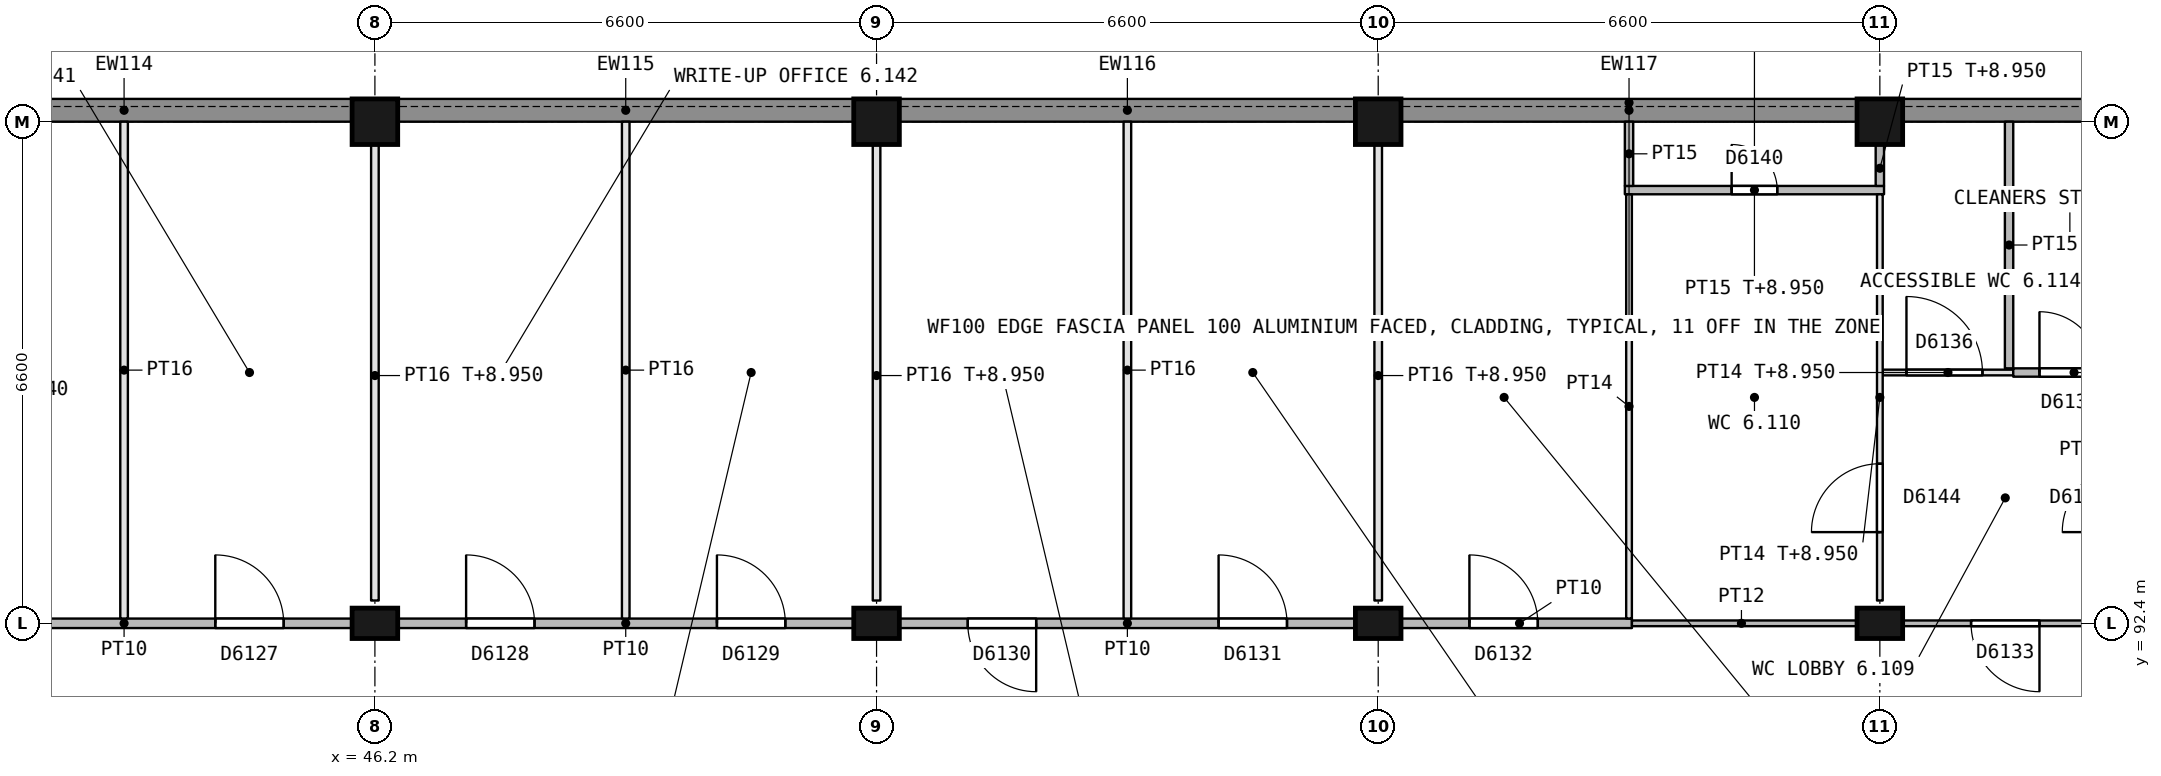
"""IFC4 building model, lengths in metres.
Left out: names, types, materials, properties, quantities, classifications, styles, units other than length and angle.
Written with IfcOpenShell. Run it as: python <this file> out.ifc"""

import sys

from ifc_helpers import new_model, si_unit, direction, frame, frame_2d, origin, origin_2d, place, context, subcontext, project, spatial, rectangle, extrude, element, fill, save


model = new_model("IFC4")
c1 = context("Model", 3, precision=1e-05, world=origin(), true_north=direction((0.0, 1.0)))
c2 = subcontext(c1, "Body", "Model", "MODEL_VIEW")
j1 = project(units=[si_unit("LENGTHUNIT", "METRE"), si_unit("PLANEANGLEUNIT", "RADIAN")], contexts=[c1])
p1 = place(None, origin())
s1 = spatial("IfcSite", under=j1, at=p1, CompositionType="ELEMENT")
p2 = place(p1, origin())
s2 = spatial("IfcBuilding", under=s1, at=p2, CompositionType="ELEMENT")
p3 = place(p2, frame((0.0, 0.0, 5.4)))
s3 = spatial("IfcBuildingStorey", under=s2, at=p3, CompositionType="ELEMENT", Elevation=5.4)
p4 = place(p3, frame((46.2, 92.4, 0.0), z_axis=(0.0, 0.0, 1.0), x_axis=(1.0, 0.0, 0.0)))
e1 = element("IfcColumn", 1, at=p4, inside=s3, PredefinedType="COLUMN", context=c2, shape_type="SweptSolid", body=[
    extrude(rectangle(XDim=0.6, YDim=0.4, at=origin_2d()), origin(), (0.0, 0.0, 1.0), 4.5),
])
p5 = place(p3, frame((46.2, 99.0, 0.0), z_axis=(0.0, 0.0, 1.0), x_axis=(1.0, 0.0, 0.0)))
e2 = element("IfcColumn", 2, at=p5, inside=s3, PredefinedType="COLUMN", context=c2, shape_type="SweptSolid", body=[
    extrude(rectangle(XDim=0.6, YDim=0.6, at=origin_2d()), origin(), (0.0, 0.0, 1.0), 4.5),
])
p6 = place(p3, frame((52.8, 92.4, 0.0), z_axis=(0.0, 0.0, 1.0), x_axis=(1.0, 0.0, 0.0)))
e3 = element("IfcColumn", 3, at=p6, inside=s3, PredefinedType="COLUMN", context=c2, shape_type="SweptSolid", body=[
    extrude(rectangle(XDim=0.6, YDim=0.4, at=origin_2d()), origin(), (0.0, 0.0, 1.0), 4.5),
])
p7 = place(p3, frame((52.8, 99.0, 0.0), z_axis=(0.0, 0.0, 1.0), x_axis=(1.0, 0.0, 0.0)))
e4 = element("IfcColumn", 4, at=p7, inside=s3, PredefinedType="COLUMN", context=c2, shape_type="SweptSolid", body=[
    extrude(rectangle(XDim=0.6, YDim=0.6, at=origin_2d()), origin(), (0.0, 0.0, 1.0), 4.5),
])
p8 = place(p3, frame((59.4, 92.4, 0.0), z_axis=(0.0, 0.0, 1.0), x_axis=(1.0, 0.0, 0.0)))
e5 = element("IfcColumn", 5, at=p8, inside=s3, PredefinedType="COLUMN", context=c2, shape_type="SweptSolid", body=[
    extrude(rectangle(XDim=0.6, YDim=0.4, at=origin_2d()), origin(), (0.0, 0.0, 1.0), 4.5),
])
p9 = place(p3, frame((59.4, 99.0, 0.0), z_axis=(0.0, 0.0, 1.0), x_axis=(1.0, 0.0, 0.0)))
e6 = element("IfcColumn", 6, at=p9, inside=s3, PredefinedType="COLUMN", context=c2, shape_type="SweptSolid", body=[
    extrude(rectangle(XDim=0.6, YDim=0.6, at=origin_2d()), origin(), (0.0, 0.0, 1.0), 4.5),
])
p10 = place(p3, frame((66.0, 92.4, 0.0), z_axis=(0.0, 0.0, 1.0), x_axis=(1.0, 0.0, 0.0)))
e7 = element("IfcColumn", 7, at=p10, inside=s3, PredefinedType="COLUMN", context=c2, shape_type="SweptSolid", body=[
    extrude(rectangle(XDim=0.6, YDim=0.4, at=origin_2d()), origin(), (0.0, 0.0, 1.0), 4.5),
])
p11 = place(p3, frame((66.0, 99.0, 0.0), z_axis=(0.0, 0.0, 1.0), x_axis=(1.0, 0.0, 0.0)))
e8 = element("IfcColumn", 8, at=p11, inside=s3, PredefinedType="COLUMN", context=c2, shape_type="SweptSolid", body=[
    extrude(rectangle(XDim=0.6, YDim=0.6, at=origin_2d()), origin(), (0.0, 0.0, 1.0), 4.5),
])
for number, where, z_axis, x_axis in (
    (9, (39.9, 99.15, 0.0), (0.0, 0.0, 1.0), (1.0, 0.0, 0.0)),
    (10, (46.5, 99.15, 0.0), (0.0, 0.0, 1.0), (1.0, 0.0, 0.0)),
    (11, (53.1, 99.15, 0.0), (0.0, 0.0, 1.0), (1.0, 0.0, 0.0)),
    (12, (59.7, 99.15, 0.0), (0.0, 0.0, 1.0), (1.0, 0.0, 0.0)),
):
    element("IfcWall", number, at=place(p3, frame(where, z_axis=z_axis, x_axis=x_axis)), inside=s3, PredefinedType="STANDARD", context=c2, shape_type="SweptSolid", body=[
        extrude(rectangle(XDim=6.0, YDim=0.3, at=frame_2d((3.0, 0.0))), origin(), (0.0, 0.0, 1.0), 3.65),
    ])
p12 = place(p3, frame((66.3, 99.15, 0.0), z_axis=(0.0, 0.0, 1.0), x_axis=(1.0, 0.0, 0.0)))
e13 = element("IfcWall", 13, at=p12, inside=s3, PredefinedType="STANDARD", context=c2, shape_type="SweptSolid", body=[
    extrude(rectangle(XDim=6.3, YDim=0.3, at=frame_2d((3.15, 0.0))), origin(), (0.0, 0.0, 1.0), 3.65),
])
p13 = place(p3, frame((39.9, 92.4, 0.0), z_axis=(0.0, 0.0, 1.0), x_axis=(1.0, 0.0, 0.0)))
e14 = element("IfcWall", 14, at=p13, inside=s3, PredefinedType="PARTITIONING", context=c2, shape_type="SweptSolid", body=[
    extrude(rectangle(XDim=6.0, YDim=0.125, at=frame_2d((3.0, 0.0))), origin(), (0.0, 0.0, 1.0), 3.65),
])
p14 = place(p13, frame((0.9, 0.0, 0.0)))
e15 = element("IfcOpeningElement", 15, at=p14, cuts=e14, PredefinedType="OPENING", context=c2, shape_type="SweptSolid", body=[
    extrude(rectangle(XDim=0.9, YDim=2.1, at=frame_2d((0.45, 1.05))), frame((0.0, 0.073, 0.0), z_axis=(0.0, -1.0, 0.0), x_axis=(1.0, 0.0, 0.0)), (0.0, 0.0, 1.0), 0.145),
])
p15 = place(p13, frame((4.2, 0.0, 0.0)))
e16 = element("IfcOpeningElement", 16, at=p15, cuts=e14, PredefinedType="OPENING", context=c2, shape_type="SweptSolid", body=[
    extrude(rectangle(XDim=0.9, YDim=2.1, at=frame_2d((0.45, 1.05))), frame((0.0, 0.073, 0.0), z_axis=(0.0, -1.0, 0.0), x_axis=(1.0, 0.0, 0.0)), (0.0, 0.0, 1.0), 0.145),
])
p16 = place(p3, frame((46.5, 92.4, 0.0), z_axis=(0.0, 0.0, 1.0), x_axis=(1.0, 0.0, 0.0)))
e17 = element("IfcWall", 17, at=p16, inside=s3, PredefinedType="PARTITIONING", context=c2, shape_type="SweptSolid", body=[
    extrude(rectangle(XDim=6.0, YDim=0.125, at=frame_2d((3.0, 0.0))), origin(), (0.0, 0.0, 1.0), 3.65),
])
p17 = place(p16, frame((0.9, 0.0, 0.0)))
e18 = element("IfcOpeningElement", 18, at=p17, cuts=e17, PredefinedType="OPENING", context=c2, shape_type="SweptSolid", body=[
    extrude(rectangle(XDim=0.9, YDim=2.1, at=frame_2d((0.45, 1.05))), frame((0.0, 0.073, 0.0), z_axis=(0.0, -1.0, 0.0), x_axis=(1.0, 0.0, 0.0)), (0.0, 0.0, 1.0), 0.145),
])
p18 = place(p16, frame((4.2, 0.0, 0.0)))
e19 = element("IfcOpeningElement", 19, at=p18, cuts=e17, PredefinedType="OPENING", context=c2, shape_type="SweptSolid", body=[
    extrude(rectangle(XDim=0.9, YDim=2.1, at=frame_2d((0.45, 1.05))), frame((0.0, 0.073, 0.0), z_axis=(0.0, -1.0, 0.0), x_axis=(1.0, 0.0, 0.0)), (0.0, 0.0, 1.0), 0.145),
])
p19 = place(p3, frame((53.1, 92.4, 0.0), z_axis=(0.0, 0.0, 1.0), x_axis=(1.0, 0.0, 0.0)))
e20 = element("IfcWall", 20, at=p19, inside=s3, PredefinedType="PARTITIONING", context=c2, shape_type="SweptSolid", body=[
    extrude(rectangle(XDim=6.0, YDim=0.125, at=frame_2d((3.0, 0.0))), origin(), (0.0, 0.0, 1.0), 3.65),
])
p20 = place(p19, frame((0.9, 0.0, 0.0)))
e21 = element("IfcOpeningElement", 21, at=p20, cuts=e20, PredefinedType="OPENING", context=c2, shape_type="SweptSolid", body=[
    extrude(rectangle(XDim=0.9, YDim=2.1, at=frame_2d((0.45, 1.05))), frame((0.0, 0.073, 0.0), z_axis=(0.0, -1.0, 0.0), x_axis=(1.0, 0.0, 0.0)), (0.0, 0.0, 1.0), 0.145),
])
p21 = place(p19, frame((4.2, 0.0, 0.0)))
e22 = element("IfcOpeningElement", 22, at=p21, cuts=e20, PredefinedType="OPENING", context=c2, shape_type="SweptSolid", body=[
    extrude(rectangle(XDim=0.9, YDim=2.1, at=frame_2d((0.45, 1.05))), frame((0.0, 0.073, 0.0), z_axis=(0.0, -1.0, 0.0), x_axis=(1.0, 0.0, 0.0)), (0.0, 0.0, 1.0), 0.145),
])
p22 = place(p3, frame((59.7, 92.4, 0.0), z_axis=(0.0, 0.0, 1.0), x_axis=(1.0, 0.0, 0.0)))
e23 = element("IfcWall", 23, at=p22, inside=s3, PredefinedType="PARTITIONING", context=c2, shape_type="SweptSolid", body=[
    extrude(rectangle(XDim=3.038, YDim=0.125, at=frame_2d((1.519, 0.0))), origin(), (0.0, 0.0, 1.0), 3.65),
])
p23 = place(p22, frame((0.9, 0.0, 0.0)))
e24 = element("IfcOpeningElement", 24, at=p23, cuts=e23, PredefinedType="OPENING", context=c2, shape_type="SweptSolid", body=[
    extrude(rectangle(XDim=0.9, YDim=2.1, at=frame_2d((0.45, 1.05))), frame((0.0, 0.073, 0.0), z_axis=(0.0, -1.0, 0.0), x_axis=(1.0, 0.0, 0.0)), (0.0, 0.0, 1.0), 0.145),
])
p24 = place(p3, frame((62.738, 92.4, 0.0), z_axis=(0.0, 0.0, 1.0), x_axis=(1.0, 0.0, 0.0)))
e25 = element("IfcWall", 25, at=p24, inside=s3, PredefinedType="PARTITIONING", context=c2, shape_type="SweptSolid", body=[
    extrude(rectangle(XDim=2.962, YDim=0.075, at=frame_2d((1.481, 0.0))), origin(), (0.0, 0.0, 1.0), 3.65),
])
p25 = place(p3, frame((66.3, 92.4, 0.0), z_axis=(0.0, 0.0, 1.0), x_axis=(1.0, 0.0, 0.0)))
e26 = element("IfcWall", 26, at=p25, inside=s3, PredefinedType="PARTITIONING", context=c2, shape_type="SweptSolid", body=[
    extrude(rectangle(XDim=6.0, YDim=0.075, at=frame_2d((3.0, 0.0))), origin(), (0.0, 0.0, 1.0), 3.65),
])
p26 = place(p25, frame((0.9, 0.0, 0.0)))
e27 = element("IfcOpeningElement", 27, at=p26, cuts=e26, PredefinedType="OPENING", context=c2, shape_type="SweptSolid", body=[
    extrude(rectangle(XDim=0.9, YDim=2.1, at=frame_2d((0.45, 1.05))), frame((0.0, 0.047, 0.0), z_axis=(0.0, -1.0, 0.0), x_axis=(1.0, 0.0, 0.0)), (0.0, 0.0, 1.0), 0.095),
])
p27 = place(p3, frame((67.755, 95.7, 0.0), z_axis=(0.0, 0.0, 1.0), x_axis=(-1.0, 0.0, 0.0)))
e28 = element("IfcWall", 28, at=p27, inside=s3, PredefinedType="PARTITIONING", context=c2, shape_type="SweptSolid", body=[
    extrude(rectangle(XDim=1.718, YDim=0.075, at=frame_2d((0.859, 0.0))), origin(), (0.0, 0.0, 1.0), 3.55),
])
p28 = place(p27, frame((0.405, 0.0, 0.0)))
e29 = element("IfcOpeningElement", 29, at=p28, cuts=e28, PredefinedType="OPENING", context=c2, shape_type="SweptSolid", body=[
    extrude(rectangle(XDim=1.0, YDim=2.1, at=frame_2d((0.5, 1.05))), frame((0.0, 0.047, 0.0), z_axis=(0.0, -1.0, 0.0), x_axis=(1.0, 0.0, 0.0)), (0.0, 0.0, 1.0), 0.095),
])
p29 = place(p3, frame((67.755, 95.7, 0.0), z_axis=(0.0, 0.0, 1.0), x_axis=(1.0, 0.0, 0.0)))
e30 = element("IfcWall", 30, at=p29, inside=s3, PredefinedType="PARTITIONING", context=c2, shape_type="SweptSolid", body=[
    extrude(rectangle(XDim=1.6, YDim=0.11, at=frame_2d((0.8, 0.0))), origin(), (0.0, 0.0, 1.0), 4.25),
])
p30 = place(p29, frame((0.345, 0.0, 0.0)))
e31 = element("IfcOpeningElement", 31, at=p30, cuts=e30, PredefinedType="OPENING", context=c2, shape_type="SweptSolid", body=[
    extrude(rectangle(XDim=0.8, YDim=2.1, at=frame_2d((0.4, 1.05))), frame((0.0, 0.065, 0.0), z_axis=(0.0, -1.0, 0.0), x_axis=(1.0, 0.0, 0.0)), (0.0, 0.0, 1.0), 0.13),
])
p31 = place(p3, frame((66.055, 98.1, 0.0), z_axis=(0.0, 0.0, 1.0), x_axis=(-1.0, 0.0, 0.0)))
e32 = element("IfcWall", 32, at=p31, inside=s3, PredefinedType="PARTITIONING", context=c2, shape_type="SweptSolid", body=[
    extrude(rectangle(XDim=3.41, YDim=0.11, at=frame_2d((1.705, 0.0))), origin(), (0.0, 0.0, 1.0), 3.55),
])
p32 = place(p31, frame((1.405, 0.0, 0.0)))
e33 = element("IfcOpeningElement", 33, at=p32, cuts=e32, PredefinedType="OPENING", context=c2, shape_type="SweptSolid", body=[
    extrude(rectangle(XDim=0.6, YDim=2.1, at=frame_2d((0.3, 1.05))), frame((0.0, 0.065, 0.0), z_axis=(0.0, -1.0, 0.0), x_axis=(1.0, 0.0, 0.0)), (0.0, 0.0, 1.0), 0.13),
])
p33 = place(p3, frame((42.9, 92.463, 0.0), z_axis=(0.0, 0.0, 1.0), x_axis=(0.0, 1.0, 0.0)))
e34 = element("IfcWall", 34, at=p33, inside=s3, PredefinedType="PARTITIONING", context=c2, shape_type="SweptSolid", body=[
    extrude(rectangle(XDim=6.537, YDim=0.1, at=frame_2d((3.269, 0.0))), origin(), (0.0, 0.0, 1.0), 3.65),
])
p34 = place(p3, frame((46.2, 92.7, 0.0), z_axis=(0.0, 0.0, 1.0), x_axis=(0.0, 1.0, 0.0)))
e35 = element("IfcWall", 35, at=p34, inside=s3, PredefinedType="PARTITIONING", context=c2, shape_type="SweptSolid", body=[
    extrude(rectangle(XDim=6.0, YDim=0.1, at=frame_2d((3.0, 0.0))), origin(), (0.0, 0.0, 1.0), 3.55),
])
p35 = place(p3, frame((49.5, 92.463, 0.0), z_axis=(0.0, 0.0, 1.0), x_axis=(0.0, 1.0, 0.0)))
e36 = element("IfcWall", 36, at=p35, inside=s3, PredefinedType="PARTITIONING", context=c2, shape_type="SweptSolid", body=[
    extrude(rectangle(XDim=6.537, YDim=0.1, at=frame_2d((3.269, 0.0))), origin(), (0.0, 0.0, 1.0), 3.65),
])
p36 = place(p3, frame((52.8, 92.7, 0.0), z_axis=(0.0, 0.0, 1.0), x_axis=(0.0, 1.0, 0.0)))
e37 = element("IfcWall", 37, at=p36, inside=s3, PredefinedType="PARTITIONING", context=c2, shape_type="SweptSolid", body=[
    extrude(rectangle(XDim=6.0, YDim=0.1, at=frame_2d((3.0, 0.0))), origin(), (0.0, 0.0, 1.0), 3.55),
])
p37 = place(p3, frame((56.1, 92.463, 0.0), z_axis=(0.0, 0.0, 1.0), x_axis=(0.0, 1.0, 0.0)))
e38 = element("IfcWall", 38, at=p37, inside=s3, PredefinedType="PARTITIONING", context=c2, shape_type="SweptSolid", body=[
    extrude(rectangle(XDim=6.537, YDim=0.1, at=frame_2d((3.269, 0.0))), origin(), (0.0, 0.0, 1.0), 3.65),
])
p38 = place(p3, frame((59.4, 92.7, 0.0), z_axis=(0.0, 0.0, 1.0), x_axis=(0.0, 1.0, 0.0)))
e39 = element("IfcWall", 39, at=p38, inside=s3, PredefinedType="PARTITIONING", context=c2, shape_type="SweptSolid", body=[
    extrude(rectangle(XDim=6.0, YDim=0.1, at=frame_2d((3.0, 0.0))), origin(), (0.0, 0.0, 1.0), 3.55),
])
p39 = place(p3, frame((62.7, 92.463, 0.0), z_axis=(0.0, 0.0, 1.0), x_axis=(0.0, 1.0, 0.0)))
e40 = element("IfcWall", 40, at=p39, inside=s3, PredefinedType="PARTITIONING", context=c2, shape_type="SweptSolid", body=[
    extrude(rectangle(XDim=5.582, YDim=0.075, at=frame_2d((2.791, 0.0))), origin(), (0.0, 0.0, 1.0), 3.65),
])
p40 = place(p3, frame((62.7, 98.155, 0.0), z_axis=(0.0, 0.0, 1.0), x_axis=(0.0, 1.0, 0.0)))
e41 = element("IfcWall", 41, at=p40, inside=s3, PredefinedType="PARTITIONING", context=c2, shape_type="SweptSolid", body=[
    extrude(rectangle(XDim=0.845, YDim=0.11, at=frame_2d((0.422, 0.0))), origin(), (0.0, 0.0, 1.0), 3.65),
])
p41 = place(p3, frame((66.0, 92.7, 0.0), z_axis=(0.0, 0.0, 1.0), x_axis=(0.0, 1.0, 0.0)))
e42 = element("IfcWall", 42, at=p41, inside=s3, PredefinedType="PARTITIONING", context=c2, shape_type="SweptSolid", body=[
    extrude(rectangle(XDim=5.345, YDim=0.075, at=frame_2d((2.672, 0.0))), origin(), (0.0, 0.0, 1.0), 3.55),
])
p42 = place(p41, frame((0.9, 0.0, 0.0)))
e43 = element("IfcOpeningElement", 43, at=p42, cuts=e42, PredefinedType="OPENING", context=c2, shape_type="SweptSolid", body=[
    extrude(rectangle(XDim=0.9, YDim=2.1, at=frame_2d((0.45, 1.05))), frame((0.0, 0.047, 0.0), z_axis=(0.0, -1.0, 0.0), x_axis=(1.0, 0.0, 0.0)), (0.0, 0.0, 1.0), 0.095),
])
p43 = place(p3, frame((66.0, 98.155, 0.0), z_axis=(0.0, 0.0, 1.0), x_axis=(0.0, 1.0, 0.0)))
e44 = element("IfcWall", 44, at=p43, inside=s3, PredefinedType="PARTITIONING", context=c2, shape_type="SweptSolid", body=[
    extrude(rectangle(XDim=0.545, YDim=0.11, at=frame_2d((0.272, 0.0))), origin(), (0.0, 0.0, 1.0), 3.55),
])
p44 = place(p3, frame((67.7, 95.755, 0.0), z_axis=(0.0, 0.0, 1.0), x_axis=(0.0, 1.0, 0.0)))
e45 = element("IfcWall", 45, at=p44, inside=s3, PredefinedType="PARTITIONING", context=c2, shape_type="SweptSolid", body=[
    extrude(rectangle(XDim=3.245, YDim=0.11, at=frame_2d((1.623, 0.0))), origin(), (0.0, 0.0, 1.0), 3.65),
])
p45 = place(p15, origin())
e46 = element("IfcDoor", 46, at=p45, inside=s3, OperationType="SINGLE_SWING_LEFT", PredefinedType="DOOR", context=c2, shape_type="SweptSolid", body=[
    extrude(rectangle(XDim=0.9, YDim=2.1, at=frame_2d((0.45, 1.05))), frame((0.0, 0.025, 0.0), z_axis=(0.0, -1.0, 0.0), x_axis=(1.0, 0.0, 0.0)), (0.0, 0.0, 1.0), 0.05),
])
fill(e16, e46)
p46 = place(p17, origin())
e47 = element("IfcDoor", 47, at=p46, inside=s3, OperationType="SINGLE_SWING_LEFT", PredefinedType="DOOR", context=c2, shape_type="SweptSolid", body=[
    extrude(rectangle(XDim=0.9, YDim=2.1, at=frame_2d((0.45, 1.05))), frame((0.0, 0.025, 0.0), z_axis=(0.0, -1.0, 0.0), x_axis=(1.0, 0.0, 0.0)), (0.0, 0.0, 1.0), 0.05),
])
fill(e18, e47)
p47 = place(p18, origin())
e48 = element("IfcDoor", 48, at=p47, inside=s3, OperationType="SINGLE_SWING_LEFT", PredefinedType="DOOR", context=c2, shape_type="SweptSolid", body=[
    extrude(rectangle(XDim=0.9, YDim=2.1, at=frame_2d((0.45, 1.05))), frame((0.0, 0.025, 0.0), z_axis=(0.0, -1.0, 0.0), x_axis=(1.0, 0.0, 0.0)), (0.0, 0.0, 1.0), 0.05),
])
fill(e19, e48)
p48 = place(p20, origin())
e49 = element("IfcDoor", 49, at=p48, inside=s3, OperationType="SINGLE_SWING_RIGHT", PredefinedType="DOOR", context=c2, shape_type="SweptSolid", body=[
    extrude(rectangle(XDim=0.9, YDim=2.1, at=frame_2d((0.45, 1.05))), frame((0.0, 0.025, 0.0), z_axis=(0.0, -1.0, 0.0), x_axis=(1.0, 0.0, 0.0)), (0.0, 0.0, 1.0), 0.05),
])
fill(e21, e49)
p49 = place(p21, origin())
e50 = element("IfcDoor", 50, at=p49, inside=s3, OperationType="SINGLE_SWING_LEFT", PredefinedType="DOOR", context=c2, shape_type="SweptSolid", body=[
    extrude(rectangle(XDim=0.9, YDim=2.1, at=frame_2d((0.45, 1.05))), frame((0.0, 0.025, 0.0), z_axis=(0.0, -1.0, 0.0), x_axis=(1.0, 0.0, 0.0)), (0.0, 0.0, 1.0), 0.05),
])
fill(e22, e50)
p50 = place(p23, origin())
e51 = element("IfcDoor", 51, at=p50, inside=s3, OperationType="SINGLE_SWING_LEFT", PredefinedType="DOOR", context=c2, shape_type="SweptSolid", body=[
    extrude(rectangle(XDim=0.9, YDim=2.1, at=frame_2d((0.45, 1.05))), frame((0.0, 0.025, 0.0), z_axis=(0.0, -1.0, 0.0), x_axis=(1.0, 0.0, 0.0)), (0.0, 0.0, 1.0), 0.05),
])
fill(e24, e51)
p51 = place(p26, origin())
e52 = element("IfcDoor", 52, at=p51, inside=s3, OperationType="SINGLE_SWING_RIGHT", PredefinedType="DOOR", context=c2, shape_type="SweptSolid", body=[
    extrude(rectangle(XDim=0.9, YDim=2.1, at=frame_2d((0.45, 1.05))), frame((0.0, 0.025, 0.0), z_axis=(0.0, -1.0, 0.0), x_axis=(1.0, 0.0, 0.0)), (0.0, 0.0, 1.0), 0.05),
])
fill(e27, e52)
p52 = place(p28, origin())
e53 = element("IfcDoor", 53, at=p52, inside=s3, OperationType="SINGLE_SWING_RIGHT", PredefinedType="DOOR", context=c2, shape_type="SweptSolid", body=[
    extrude(rectangle(XDim=1.0, YDim=2.1, at=frame_2d((0.5, 1.05))), frame((0.0, 0.025, 0.0), z_axis=(0.0, -1.0, 0.0), x_axis=(1.0, 0.0, 0.0)), (0.0, 0.0, 1.0), 0.05),
])
fill(e29, e53)
p53 = place(p30, origin())
e54 = element("IfcDoor", 54, at=p53, inside=s3, OperationType="SINGLE_SWING_LEFT", PredefinedType="DOOR", context=c2, shape_type="SweptSolid", body=[
    extrude(rectangle(XDim=0.8, YDim=2.1, at=frame_2d((0.4, 1.05))), frame((0.0, 0.025, 0.0), z_axis=(0.0, -1.0, 0.0), x_axis=(1.0, 0.0, 0.0)), (0.0, 0.0, 1.0), 0.05),
])
fill(e31, e54)
p54 = place(p32, origin())
e55 = element("IfcDoor", 55, at=p54, inside=s3, OperationType="SINGLE_SWING_RIGHT", PredefinedType="DOOR", context=c2, shape_type="SweptSolid", body=[
    extrude(rectangle(XDim=0.6, YDim=2.1, at=frame_2d((0.3, 1.05))), frame((0.0, 0.025, 0.0), z_axis=(0.0, -1.0, 0.0), x_axis=(1.0, 0.0, 0.0)), (0.0, 0.0, 1.0), 0.05),
])
fill(e33, e55)
p55 = place(p42, origin())
e56 = element("IfcDoor", 56, at=p55, inside=s3, OperationType="SINGLE_SWING_LEFT", PredefinedType="DOOR", context=c2, shape_type="SweptSolid", body=[
    extrude(rectangle(XDim=0.9, YDim=2.1, at=frame_2d((0.45, 1.05))), frame((0.0, 0.025, 0.0), z_axis=(0.0, -1.0, 0.0), x_axis=(1.0, 0.0, 0.0)), (0.0, 0.0, 1.0), 0.05),
])
fill(e43, e56)
save(model, sys.argv[1])
